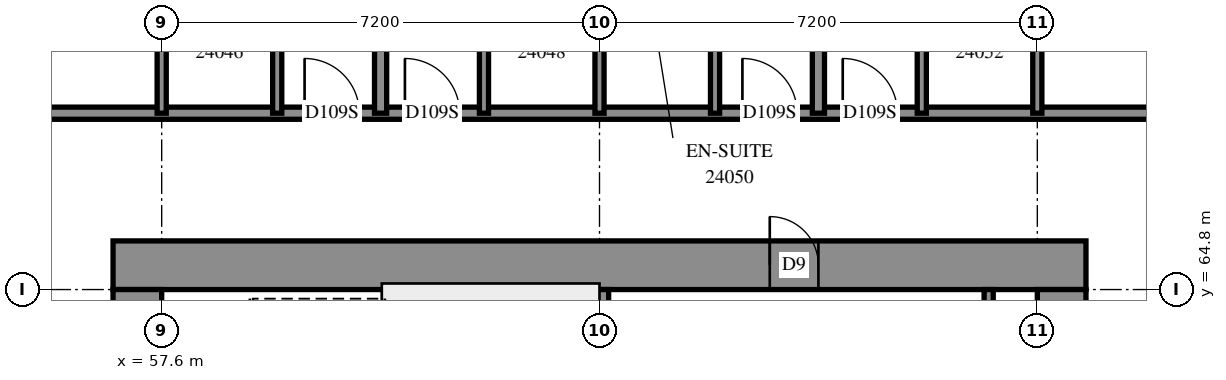
"""IFC4 building model, lengths in metres.
Left out: names, types, materials, properties, quantities, classifications, styles, units other than length and angle.
Written with IfcOpenShell. Run it as: python <this file> out.ifc"""

import sys

from ifc_helpers import new_model, si_unit, direction, frame, frame_2d, origin, place, context, subcontext, project, spatial, rectangle, extrude, element, fill, save


model = new_model("IFC4")
c1 = context("Model", 3, precision=1e-05, world=origin(), true_north=direction((0.0, 1.0)))
c2 = subcontext(c1, "Body", "Model", "MODEL_VIEW")
j1 = project(units=[si_unit("LENGTHUNIT", "METRE"), si_unit("PLANEANGLEUNIT", "RADIAN")], contexts=[c1])
p1 = place(None, origin())
s1 = spatial("IfcSite", under=j1, at=p1, CompositionType="ELEMENT")
p2 = place(p1, origin())
s2 = spatial("IfcBuilding", under=s1, at=p2, CompositionType="ELEMENT")
p3 = place(p2, frame((0.0, 0.0, 91.4)))
s3 = spatial("IfcBuildingStorey", under=s2, at=p3, CompositionType="ELEMENT", Elevation=91.4)
p4 = place(p3, frame((56.8, 65.2, -0.3), z_axis=(0.0, 0.0, 1.0), x_axis=(1.0, 0.0, 0.0)))
e1 = element("IfcWall", 1, at=p4, inside=s3, PredefinedType="SHEAR", context=c2, shape_type="SweptSolid", body=[
    extrude(rectangle(XDim=16.0, YDim=0.8, at=frame_2d((8.0, 0.0))), origin(), (0.0, 0.0, 1.0), 2.7),
])
p5 = place(p4, frame((10.8, 0.0, 0.3)))
e2 = element("IfcOpeningElement", 2, at=p5, cuts=e1, PredefinedType="OPENING", context=c2, shape_type="SweptSolid", body=[
    extrude(rectangle(XDim=0.8, YDim=2.1, at=frame_2d((0.4, 1.05))), frame((0.0, 0.41, 0.0), z_axis=(0.0, -1.0, 0.0), x_axis=(1.0, 0.0, 0.0)), (0.0, 0.0, 1.0), 0.82),
])
p6 = place(p3, frame((57.2, 50.4, -0.3), z_axis=(0.0, 0.0, 1.0), x_axis=(0.0, 1.0, 0.0)))
e3 = element("IfcWall", 3, at=p6, inside=s3, PredefinedType="SHEAR", context=c2, shape_type="SweptSolid", body=[
    extrude(rectangle(XDim=14.4, YDim=0.8, at=frame_2d((7.2, 0.0))), origin(), (0.0, 0.0, 1.0), 2.7),
])
p7 = place(p6, frame((4.55, 0.0, 0.3)))
e4 = element("IfcOpeningElement", 4, at=p7, cuts=e3, PredefinedType="OPENING", context=c2, shape_type="SweptSolid", body=[
    extrude(rectangle(XDim=1.1, YDim=2.1, at=frame_2d((0.55, 1.05))), frame((0.0, 0.41, 0.0), z_axis=(0.0, -1.0, 0.0), x_axis=(1.0, 0.0, 0.0)), (0.0, 0.0, 1.0), 0.82),
])
p8 = place(p6, frame((11.35, 0.0, 0.3)))
e5 = element("IfcOpeningElement", 5, at=p8, cuts=e3, PredefinedType="OPENING", context=c2, shape_type="SweptSolid", body=[
    extrude(rectangle(XDim=1.1, YDim=2.1, at=frame_2d((0.55, 1.05))), frame((0.0, 0.41, 0.0), z_axis=(0.0, -1.0, 0.0), x_axis=(1.0, 0.0, 0.0)), (0.0, 0.0, 1.0), 0.82),
])
p9 = place(p3, frame((72.4, 50.4, -0.3), z_axis=(0.0, 0.0, 1.0), x_axis=(0.0, 1.0, 0.0)))
e6 = element("IfcWall", 6, at=p9, inside=s3, PredefinedType="SHEAR", context=c2, shape_type="SweptSolid", body=[
    extrude(rectangle(XDim=14.4, YDim=0.8, at=frame_2d((7.2, 0.0))), origin(), (0.0, 0.0, 1.0), 2.7),
])
p10 = place(p9, frame((4.55, 0.0, 0.3)))
e7 = element("IfcOpeningElement", 7, at=p10, cuts=e6, PredefinedType="OPENING", context=c2, shape_type="SweptSolid", body=[
    extrude(rectangle(XDim=1.1, YDim=2.1, at=frame_2d((0.55, 1.05))), frame((0.0, 0.41, 0.0), z_axis=(0.0, -1.0, 0.0), x_axis=(1.0, 0.0, 0.0)), (0.0, 0.0, 1.0), 0.82),
])
p11 = place(p9, frame((11.35, 0.0, 0.3)))
e8 = element("IfcOpeningElement", 8, at=p11, cuts=e6, PredefinedType="OPENING", context=c2, shape_type="SweptSolid", body=[
    extrude(rectangle(XDim=1.1, YDim=2.1, at=frame_2d((0.55, 1.05))), frame((0.0, 0.41, 0.0), z_axis=(0.0, -1.0, 0.0), x_axis=(1.0, 0.0, 0.0)), (0.0, 0.0, 1.0), 0.82),
])
p12 = place(p3, frame((64.8, 60.6, 0.0), z_axis=(0.0, 0.0, 1.0), x_axis=(0.0, 1.0, 0.0)))
e9 = element("IfcWall", 9, at=p12, inside=s3, PredefinedType="SOLIDWALL", context=c2, shape_type="SweptSolid", body=[
    extrude(rectangle(XDim=4.2, YDim=0.3, at=frame_2d((2.1, 0.0))), origin(), (0.0, 0.0, 1.0), 3.1),
])
p13 = place(p3, frame((71.2, 63.78, 0.0), z_axis=(0.0, 0.0, 1.0), x_axis=(0.0, 1.0, 0.0)))
e10 = element("IfcWall", 10, at=p13, inside=s3, PredefinedType="PARTITIONING", context=c2, shape_type="SweptSolid", body=[
    extrude(rectangle(XDim=1.02, YDim=0.15, at=frame_2d((0.51, 0.0))), origin(), (0.0, 0.0, 1.0), 3.1),
])
p14 = place(p3, frame((54.7, 67.7, 0.0), z_axis=(0.0, 0.0, 1.0), x_axis=(1.0, 0.0, 0.0)))
e11 = element("IfcWall", 11, at=p14, inside=s3, PredefinedType="PARTITIONING", context=c2, shape_type="SweptSolid", body=[
    extrude(rectangle(XDim=20.2, YDim=0.2, at=frame_2d((10.1, 0.0))), origin(), (0.0, 0.0, 1.0), 3.1),
])
p15 = place(p14, frame((5.25, 0.0, 0.0)))
e12 = element("IfcOpeningElement", 12, at=p15, cuts=e11, PredefinedType="OPENING", context=c2, shape_type="SweptSolid", body=[
    extrude(rectangle(XDim=0.9, YDim=2.1, at=frame_2d((0.45, 1.05))), frame((0.0, 0.11, 0.0), z_axis=(0.0, -1.0, 0.0), x_axis=(1.0, 0.0, 0.0)), (0.0, 0.0, 1.0), 0.22),
])
p16 = place(p14, frame((6.9, 0.0, 0.0)))
e13 = element("IfcOpeningElement", 13, at=p16, cuts=e11, PredefinedType="OPENING", context=c2, shape_type="SweptSolid", body=[
    extrude(rectangle(XDim=0.9, YDim=2.1, at=frame_2d((0.45, 1.05))), frame((0.0, 0.11, 0.0), z_axis=(0.0, -1.0, 0.0), x_axis=(1.0, 0.0, 0.0)), (0.0, 0.0, 1.0), 0.22),
])
p17 = place(p14, frame((12.45, 0.0, 0.0)))
e14 = element("IfcOpeningElement", 14, at=p17, cuts=e11, PredefinedType="OPENING", context=c2, shape_type="SweptSolid", body=[
    extrude(rectangle(XDim=0.9, YDim=2.1, at=frame_2d((0.45, 1.05))), frame((0.0, 0.11, 0.0), z_axis=(0.0, -1.0, 0.0), x_axis=(1.0, 0.0, 0.0)), (0.0, 0.0, 1.0), 0.22),
])
p18 = place(p14, frame((14.1, 0.0, 0.0)))
e15 = element("IfcOpeningElement", 15, at=p18, cuts=e11, PredefinedType="OPENING", context=c2, shape_type="SweptSolid", body=[
    extrude(rectangle(XDim=0.9, YDim=2.1, at=frame_2d((0.45, 1.05))), frame((0.0, 0.11, 0.0), z_axis=(0.0, -1.0, 0.0), x_axis=(1.0, 0.0, 0.0)), (0.0, 0.0, 1.0), 0.22),
])
p19 = place(p3, frame((68.4, 67.7, 0.0), z_axis=(0.0, 0.0, 1.0), x_axis=(0.0, 1.0, 0.0)))
e16 = element("IfcWall", 16, at=p19, inside=s3, PredefinedType="PARTITIONING", context=c2, shape_type="SweptSolid", body=[
    extrude(rectangle(XDim=4.981, YDim=0.2, at=frame_2d((2.49, 0.0))), origin(), (0.0, 0.0, 1.0), 3.1),
])
p20 = place(p3, frame((61.2, 67.7, 0.0), z_axis=(0.0, 0.0, 1.0), x_axis=(0.0, 1.0, 0.0)))
e17 = element("IfcWall", 17, at=p20, inside=s3, PredefinedType="PARTITIONING", context=c2, shape_type="SweptSolid", body=[
    extrude(rectangle(XDim=4.953, YDim=0.2, at=frame_2d((2.477, 0.0))), origin(), (0.0, 0.0, 1.0), 3.1),
])
for number, where, z_axis, x_axis in (
    (18, (59.5, 67.7, 0.0), (0.0, 0.0, 1.0), (0.0, 1.0, 0.0)),
    (19, (57.6, 67.7, 0.0), (0.0, 0.0, 1.0), (0.0, 1.0, 0.0)),
    (20, (62.9, 67.7, 0.0), (0.0, 0.0, 1.0), (0.0, 1.0, 0.0)),
    (21, (64.8, 67.7, 0.0), (0.0, 0.0, 1.0), (0.0, 1.0, 0.0)),
    (22, (66.7, 67.7, 0.0), (0.0, 0.0, 1.0), (0.0, 1.0, 0.0)),
    (23, (70.1, 67.7, 0.0), (0.0, 0.0, 1.0), (0.0, 1.0, 0.0)),
    (24, (72.0, 67.7, 0.0), (0.0, 0.0, 1.0), (0.0, 1.0, 0.0)),
):
    element("IfcWall", number, at=place(p3, frame(where, z_axis=z_axis, x_axis=x_axis)), inside=s3, PredefinedType="PARTITIONING", context=c2, shape_type="SweptSolid", body=[
        extrude(rectangle(XDim=2.4, YDim=0.15, at=frame_2d((1.2, 0.0))), origin(), (0.0, 0.0, 1.0), 3.1),
    ])
p21 = place(p5, origin())
e25 = element("IfcDoor", 25, at=p21, inside=s3, OperationType="SINGLE_SWING_RIGHT", PredefinedType="DOOR", context=c2, shape_type="SweptSolid", body=[
    extrude(rectangle(XDim=0.8, YDim=2.1, at=frame_2d((0.4, 1.05))), frame((0.0, -0.34, 0.0), z_axis=(0.0, -1.0, 0.0), x_axis=(1.0, 0.0, 0.0)), (0.0, 0.0, 1.0), 0.05),
])
fill(e2, e25)
p22 = place(p15, origin())
e26 = element("IfcDoor", 26, at=p22, inside=s3, OperationType="SINGLE_SWING_RIGHT", PredefinedType="DOOR", context=c2, shape_type="SweptSolid", body=[
    extrude(rectangle(XDim=0.9, YDim=2.1, at=frame_2d((0.45, 1.05))), frame((0.0, 0.025, 0.0), z_axis=(0.0, -1.0, 0.0), x_axis=(1.0, 0.0, 0.0)), (0.0, 0.0, 1.0), 0.05),
])
fill(e12, e26)
p23 = place(p16, origin())
e27 = element("IfcDoor", 27, at=p23, inside=s3, OperationType="SINGLE_SWING_LEFT", PredefinedType="DOOR", context=c2, shape_type="SweptSolid", body=[
    extrude(rectangle(XDim=0.9, YDim=2.1, at=frame_2d((0.45, 1.05))), frame((0.0, 0.025, 0.0), z_axis=(0.0, -1.0, 0.0), x_axis=(1.0, 0.0, 0.0)), (0.0, 0.0, 1.0), 0.05),
])
fill(e13, e27)
p24 = place(p17, origin())
e28 = element("IfcDoor", 28, at=p24, inside=s3, OperationType="SINGLE_SWING_RIGHT", PredefinedType="DOOR", context=c2, shape_type="SweptSolid", body=[
    extrude(rectangle(XDim=0.9, YDim=2.1, at=frame_2d((0.45, 1.05))), frame((0.0, 0.025, 0.0), z_axis=(0.0, -1.0, 0.0), x_axis=(1.0, 0.0, 0.0)), (0.0, 0.0, 1.0), 0.05),
])
fill(e14, e28)
p25 = place(p18, origin())
e29 = element("IfcDoor", 29, at=p25, inside=s3, OperationType="SINGLE_SWING_LEFT", PredefinedType="DOOR", context=c2, shape_type="SweptSolid", body=[
    extrude(rectangle(XDim=0.9, YDim=2.1, at=frame_2d((0.45, 1.05))), frame((0.0, 0.025, 0.0), z_axis=(0.0, -1.0, 0.0), x_axis=(1.0, 0.0, 0.0)), (0.0, 0.0, 1.0), 0.05),
])
fill(e15, e29)
save(model, sys.argv[1])
